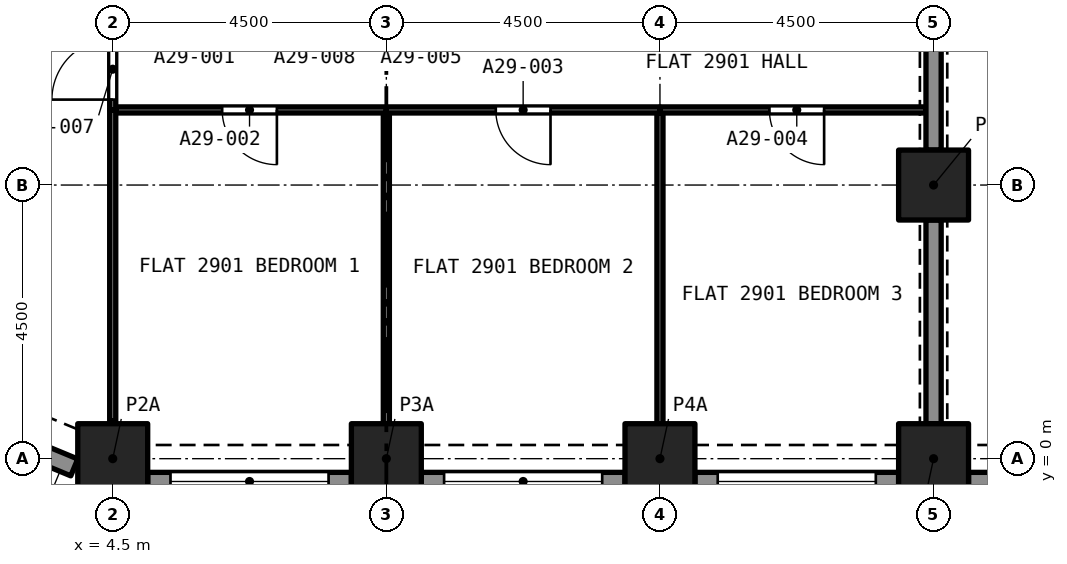
"""IFC4 building model, lengths in metres.
Left out: names, types, materials, properties, quantities, classifications, styles, units other than length and angle.
Written with IfcOpenShell. Run it as: python <this file> out.ifc"""

import sys

from ifc_helpers import new_model, si_unit, direction, frame, frame_2d, origin, origin_2d, place, context, subcontext, project, spatial, rectangle, extrude, element, fill, save


model = new_model("IFC4")
c1 = context("Model", 3, precision=1e-05, world=origin(), true_north=direction((0.0, 1.0)))
c2 = subcontext(c1, "Body", "Model", "MODEL_VIEW")
j1 = project(units=[si_unit("LENGTHUNIT", "METRE"), si_unit("PLANEANGLEUNIT", "RADIAN")], contexts=[c1])
p1 = place(None, origin())
s1 = spatial("IfcSite", under=j1, at=p1, CompositionType="ELEMENT")
p2 = place(p1, origin())
s2 = spatial("IfcBuilding", under=s1, at=p2, CompositionType="ELEMENT")
p3 = place(p2, frame((0.0, 0.0, 105.6)))
s3 = spatial("IfcBuildingStorey", under=s2, at=p3, CompositionType="ELEMENT", Elevation=105.6)
for number, where, z_axis, x_axis in (
    (1, (4.5, 0.0, 0.0), (0.0, 0.0, 1.0), (1.0, 0.0, 0.0)),
    (2, (9.0, 0.0, 0.0), (0.0, 0.0, 1.0), (1.0, 0.0, 0.0)),
    (3, (13.5, 0.0, 0.0), (0.0, 0.0, 1.0), (1.0, 0.0, 0.0)),
    (4, (18.0, 0.0, 0.0), (0.0, 0.0, 1.0), (1.0, 0.0, 0.0)),
    (5, (18.0, 4.5, 0.0), (0.0, 0.0, 1.0), (1.0, 0.0, 0.0)),
):
    element("IfcColumn", number, at=place(p3, frame(where, z_axis=z_axis, x_axis=x_axis)), inside=s3, PredefinedType="COLUMN", context=c2, shape_type="SweptSolid", body=[
        extrude(rectangle(XDim=1.15, YDim=1.15, at=origin_2d()), origin(), (0.0, 0.0, 1.0), 3.2),
    ])
p4 = place(p3, frame((3.868, -0.144, 0.0), z_axis=(0.0, 0.0, 1.0), x_axis=(-0.923862802911, 0.382723818695, 0.0)))
e6 = element("IfcWall", 6, at=p4, inside=s3, PredefinedType="SOLIDWALL", context=c2, shape_type="SweptSolid", body=[
    extrude(rectangle(XDim=2.164, YDim=0.3, at=frame_2d((1.082, 0.0))), origin(), (0.0, 0.0, 1.0), 3.2),
])
p5 = place(p4, frame((0.493, 0.0, 0.45)))
e7 = element("IfcOpeningElement", 7, at=p5, cuts=e6, PredefinedType="OPENING", context=c2, shape_type="SweptSolid", body=[
    extrude(rectangle(XDim=1.4, YDim=1.95, at=frame_2d((0.7, 0.975))), frame((0.0, 0.16, 0.0), z_axis=(0.0, -1.0, 0.0), x_axis=(1.0, 0.0, 0.0)), (0.0, 0.0, 1.0), 0.32),
])
p6 = place(p3, frame((8.425, -0.375, 0.0), z_axis=(0.0, 0.0, 1.0), x_axis=(-1.0, 0.0, 0.0)))
e8 = element("IfcWall", 8, at=p6, inside=s3, PredefinedType="SOLIDWALL", context=c2, shape_type="SweptSolid", body=[
    extrude(rectangle(XDim=3.35, YDim=0.3, at=frame_2d((1.675, 0.0))), origin(), (0.0, 0.0, 1.0), 3.2),
])
p7 = place(p6, frame((0.375, 0.0, 0.45)))
e9 = element("IfcOpeningElement", 9, at=p7, cuts=e8, PredefinedType="OPENING", context=c2, shape_type="SweptSolid", body=[
    extrude(rectangle(XDim=2.6, YDim=1.95, at=frame_2d((1.3, 0.975))), frame((0.0, 0.16, 0.0), z_axis=(0.0, -1.0, 0.0), x_axis=(1.0, 0.0, 0.0)), (0.0, 0.0, 1.0), 0.32),
])
p8 = place(p3, frame((12.925, -0.375, 0.0), z_axis=(0.0, 0.0, 1.0), x_axis=(-1.0, 0.0, 0.0)))
e10 = element("IfcWall", 10, at=p8, inside=s3, PredefinedType="SOLIDWALL", context=c2, shape_type="SweptSolid", body=[
    extrude(rectangle(XDim=3.35, YDim=0.3, at=frame_2d((1.675, 0.0))), origin(), (0.0, 0.0, 1.0), 3.2),
])
p9 = place(p8, frame((0.375, 0.0, 0.45)))
e11 = element("IfcOpeningElement", 11, at=p9, cuts=e10, PredefinedType="OPENING", context=c2, shape_type="SweptSolid", body=[
    extrude(rectangle(XDim=2.6, YDim=1.95, at=frame_2d((1.3, 0.975))), frame((0.0, 0.16, 0.0), z_axis=(0.0, -1.0, 0.0), x_axis=(1.0, 0.0, 0.0)), (0.0, 0.0, 1.0), 0.32),
])
p10 = place(p3, frame((17.425, -0.375, 0.0), z_axis=(0.0, 0.0, 1.0), x_axis=(-1.0, 0.0, 0.0)))
e12 = element("IfcWall", 12, at=p10, inside=s3, PredefinedType="SOLIDWALL", context=c2, shape_type="SweptSolid", body=[
    extrude(rectangle(XDim=3.35, YDim=0.3, at=frame_2d((1.675, 0.0))), origin(), (0.0, 0.0, 1.0), 3.2),
])
p11 = place(p10, frame((0.375, 0.0, 0.45)))
e13 = element("IfcOpeningElement", 13, at=p11, cuts=e12, PredefinedType="OPENING", context=c2, shape_type="SweptSolid", body=[
    extrude(rectangle(XDim=2.6, YDim=1.95, at=frame_2d((1.3, 0.975))), frame((0.0, 0.16, 0.0), z_axis=(0.0, -1.0, 0.0), x_axis=(1.0, 0.0, 0.0)), (0.0, 0.0, 1.0), 0.32),
])
p12 = place(p3, frame((21.925, -0.375, 0.0), z_axis=(0.0, 0.0, 1.0), x_axis=(-1.0, 0.0, 0.0)))
e14 = element("IfcWall", 14, at=p12, inside=s3, PredefinedType="SOLIDWALL", context=c2, shape_type="SweptSolid", body=[
    extrude(rectangle(XDim=3.35, YDim=0.3, at=frame_2d((1.675, 0.0))), origin(), (0.0, 0.0, 1.0), 3.2),
])
p13 = place(p12, frame((0.375, 0.0, 0.45)))
e15 = element("IfcOpeningElement", 15, at=p13, cuts=e14, PredefinedType="OPENING", context=c2, shape_type="SweptSolid", body=[
    extrude(rectangle(XDim=2.6, YDim=1.95, at=frame_2d((1.3, 0.975))), frame((0.0, 0.16, 0.0), z_axis=(0.0, -1.0, 0.0), x_axis=(1.0, 0.0, 0.0)), (0.0, 0.0, 1.0), 0.32),
])
p14 = place(p3, frame((9.0, 0.575, 0.0), z_axis=(0.0, 0.0, 1.0), x_axis=(0.0, 1.0, 0.0)))
e16 = element("IfcWall", 16, at=p14, inside=s3, PredefinedType="PARTITIONING", context=c2, shape_type="SweptSolid", body=[
    extrude(rectangle(XDim=5.11, YDim=0.1, at=frame_2d((2.555, 0.0))), origin(), (0.0, 0.0, 1.0), 2.9),
])
p15 = place(p3, frame((9.0, 5.735, 0.0), z_axis=(0.0, 0.0, 1.0), x_axis=(-1.0, 0.0, 0.0)))
e17 = element("IfcWall", 17, at=p15, inside=s3, PredefinedType="PARTITIONING", context=c2, shape_type="SweptSolid", body=[
    extrude(rectangle(XDim=4.45, YDim=0.1, at=frame_2d((2.225, 0.0))), origin(), (0.0, 0.0, 1.0), 2.9),
])
p16 = place(p15, frame((1.8, 0.0, 0.0)))
e18 = element("IfcOpeningElement", 18, at=p16, cuts=e17, PredefinedType="OPENING", context=c2, shape_type="SweptSolid", body=[
    extrude(rectangle(XDim=0.9, YDim=2.1, at=frame_2d((0.45, 1.05))), frame((0.0, 0.06, 0.0), z_axis=(0.0, -1.0, 0.0), x_axis=(1.0, 0.0, 0.0)), (0.0, 0.0, 1.0), 0.12),
])
p17 = place(p3, frame((4.5, 0.622, 0.0), z_axis=(0.0, 0.0, 1.0), x_axis=(0.0, 1.0, 0.0)))
e19 = element("IfcWall", 19, at=p17, inside=s3, PredefinedType="PARTITIONING", context=c2, shape_type="SweptSolid", body=[
    extrude(rectangle(XDim=5.113, YDim=0.1, at=frame_2d((2.556, 0.0))), origin(), (0.0, 0.0, 1.0), 2.9),
])
p18 = place(p3, frame((13.5, 0.575, 0.0), z_axis=(0.0, 0.0, 1.0), x_axis=(0.0, 1.0, 0.0)))
e20 = element("IfcWall", 20, at=p18, inside=s3, PredefinedType="PARTITIONING", context=c2, shape_type="SweptSolid", body=[
    extrude(rectangle(XDim=5.11, YDim=0.1, at=frame_2d((2.555, 0.0))), origin(), (0.0, 0.0, 1.0), 2.9),
])
p19 = place(p3, frame((13.5, 5.735, 0.0), z_axis=(0.0, 0.0, 1.0), x_axis=(-1.0, 0.0, 0.0)))
e21 = element("IfcWall", 21, at=p19, inside=s3, PredefinedType="PARTITIONING", context=c2, shape_type="SweptSolid", body=[
    extrude(rectangle(XDim=4.5, YDim=0.1, at=frame_2d((2.25, 0.0))), origin(), (0.0, 0.0, 1.0), 2.9),
])
p20 = place(p19, frame((1.8, 0.0, 0.0)))
e22 = element("IfcOpeningElement", 22, at=p20, cuts=e21, PredefinedType="OPENING", context=c2, shape_type="SweptSolid", body=[
    extrude(rectangle(XDim=0.9, YDim=2.1, at=frame_2d((0.45, 1.05))), frame((0.0, 0.06, 0.0), z_axis=(0.0, -1.0, 0.0), x_axis=(1.0, 0.0, 0.0)), (0.0, 0.0, 1.0), 0.12),
])
p21 = place(p3, frame((17.875, 5.735, 0.0), z_axis=(0.0, 0.0, 1.0), x_axis=(-1.0, 0.0, 0.0)))
e23 = element("IfcWall", 23, at=p21, inside=s3, PredefinedType="PARTITIONING", context=c2, shape_type="SweptSolid", body=[
    extrude(rectangle(XDim=4.375, YDim=0.1, at=frame_2d((2.188, 0.0))), origin(), (0.0, 0.0, 1.0), 2.9),
])
p22 = place(p21, frame((1.675, 0.0, 0.0)))
e24 = element("IfcOpeningElement", 24, at=p22, cuts=e23, PredefinedType="OPENING", context=c2, shape_type="SweptSolid", body=[
    extrude(rectangle(XDim=0.9, YDim=2.1, at=frame_2d((0.45, 1.05))), frame((0.0, 0.06, 0.0), z_axis=(0.0, -1.0, 0.0), x_axis=(1.0, 0.0, 0.0)), (0.0, 0.0, 1.0), 0.12),
])
for number, where, z_axis, x_axis in (
    (25, (18.0, 5.075, 0.0), (0.0, 0.0, 1.0), (0.0, 1.0, 0.0)),
    (26, (18.0, 0.575, 0.0), (0.0, 0.0, 1.0), (0.0, 1.0, 0.0)),
):
    element("IfcWall", number, at=place(p3, frame(where, z_axis=z_axis, x_axis=x_axis)), inside=s3, PredefinedType="PARTITIONING", context=c2, shape_type="SweptSolid", body=[
        extrude(rectangle(XDim=3.35, YDim=0.25, at=frame_2d((1.675, 0.0))), origin(), (0.0, 0.0, 1.0), 2.38),
    ])
p23 = place(p3, frame((4.5, 5.735, 0.0), z_axis=(0.0, 0.0, 1.0), x_axis=(0.0, 1.0, 0.0)))
e27 = element("IfcWall", 27, at=p23, inside=s3, PredefinedType="PARTITIONING", context=c2, shape_type="SweptSolid", body=[
    extrude(rectangle(XDim=1.34, YDim=0.1, at=frame_2d((0.67, 0.0))), origin(), (0.0, 0.0, 1.0), 2.9),
])
p24 = place(p23, frame((0.17, 0.0, 0.0)))
e28 = element("IfcOpeningElement", 28, at=p24, cuts=e27, PredefinedType="OPENING", context=c2, shape_type="SweptSolid", body=[
    extrude(rectangle(XDim=1.0, YDim=2.1, at=frame_2d((0.5, 1.05))), frame((0.0, 0.06, 0.0), z_axis=(0.0, -1.0, 0.0), x_axis=(1.0, 0.0, 0.0)), (0.0, 0.0, 1.0), 0.12),
])
p25 = place(p7, origin())
e29 = element("IfcWindow", 29, at=p25, inside=s3, PartitioningType="SINGLE_PANEL", PredefinedType="WINDOW", context=c2, shape_type="SweptSolid", body=[
    extrude(rectangle(XDim=2.6, YDim=1.95, at=frame_2d((1.3, 0.975))), frame((0.0, 0.03, 0.0), z_axis=(0.0, -1.0, 0.0), x_axis=(1.0, 0.0, 0.0)), (0.0, 0.0, 1.0), 0.06),
])
fill(e9, e29)
p26 = place(p9, origin())
e30 = element("IfcWindow", 30, at=p26, inside=s3, PartitioningType="SINGLE_PANEL", PredefinedType="WINDOW", context=c2, shape_type="SweptSolid", body=[
    extrude(rectangle(XDim=2.6, YDim=1.95, at=frame_2d((1.3, 0.975))), frame((0.0, 0.03, 0.0), z_axis=(0.0, -1.0, 0.0), x_axis=(1.0, 0.0, 0.0)), (0.0, 0.0, 1.0), 0.06),
])
fill(e11, e30)
p27 = place(p11, origin())
e31 = element("IfcWindow", 31, at=p27, inside=s3, PartitioningType="SINGLE_PANEL", PredefinedType="WINDOW", context=c2, shape_type="SweptSolid", body=[
    extrude(rectangle(XDim=2.6, YDim=1.95, at=frame_2d((1.3, 0.975))), frame((0.0, 0.03, 0.0), z_axis=(0.0, -1.0, 0.0), x_axis=(1.0, 0.0, 0.0)), (0.0, 0.0, 1.0), 0.06),
])
fill(e13, e31)
p28 = place(p16, origin())
e32 = element("IfcDoor", 32, at=p28, inside=s3, OperationType="SINGLE_SWING_RIGHT", PredefinedType="DOOR", context=c2, shape_type="SweptSolid", body=[
    extrude(rectangle(XDim=0.9, YDim=2.1, at=frame_2d((0.45, 1.05))), frame((0.0, 0.025, 0.0), z_axis=(0.0, -1.0, 0.0), x_axis=(1.0, 0.0, 0.0)), (0.0, 0.0, 1.0), 0.05),
])
fill(e18, e32)
p29 = place(p20, origin())
e33 = element("IfcDoor", 33, at=p29, inside=s3, OperationType="SINGLE_SWING_LEFT", PredefinedType="DOOR", context=c2, shape_type="SweptSolid", body=[
    extrude(rectangle(XDim=0.9, YDim=2.1, at=frame_2d((0.45, 1.05))), frame((0.0, 0.025, 0.0), z_axis=(0.0, -1.0, 0.0), x_axis=(1.0, 0.0, 0.0)), (0.0, 0.0, 1.0), 0.05),
])
fill(e22, e33)
p30 = place(p22, origin())
e34 = element("IfcDoor", 34, at=p30, inside=s3, OperationType="SINGLE_SWING_LEFT", PredefinedType="DOOR", context=c2, shape_type="SweptSolid", body=[
    extrude(rectangle(XDim=0.9, YDim=2.1, at=frame_2d((0.45, 1.05))), frame((0.0, 0.025, 0.0), z_axis=(0.0, -1.0, 0.0), x_axis=(1.0, 0.0, 0.0)), (0.0, 0.0, 1.0), 0.05),
])
fill(e24, e34)
p31 = place(p24, origin())
e35 = element("IfcDoor", 35, at=p31, inside=s3, OperationType="SINGLE_SWING_RIGHT", PredefinedType="DOOR", context=c2, shape_type="SweptSolid", body=[
    extrude(rectangle(XDim=1.0, YDim=2.1, at=frame_2d((0.5, 1.05))), frame((0.0, 0.025, 0.0), z_axis=(0.0, -1.0, 0.0), x_axis=(1.0, 0.0, 0.0)), (0.0, 0.0, 1.0), 0.05),
])
fill(e28, e35)
save(model, sys.argv[1])
